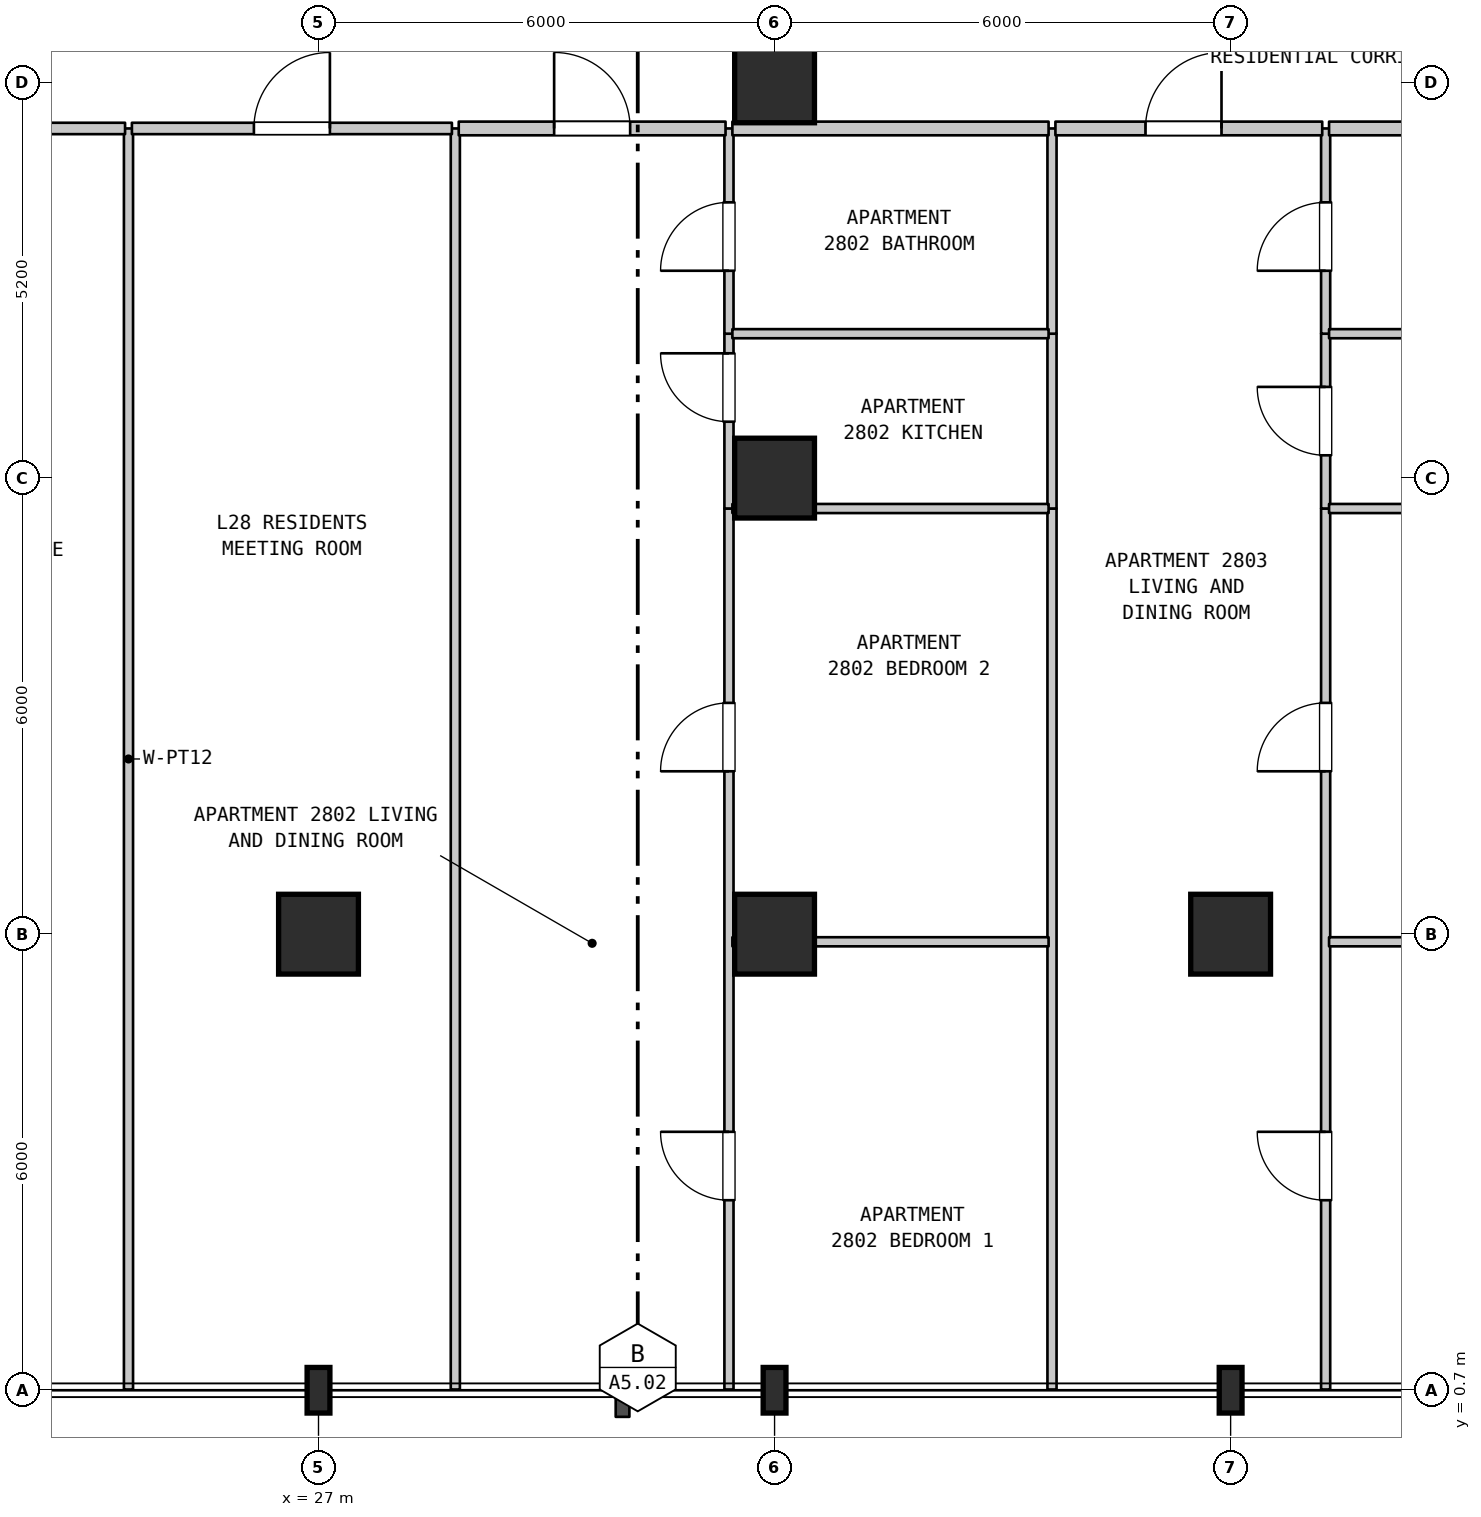
"""IFC4 building model, lengths in metres.
Left out: names, types, materials, properties, quantities, classifications, styles, units other than length and angle.
Written with IfcOpenShell. Run it as: python <this file> out.ifc"""

import sys

from ifc_helpers import new_model, si_unit, direction, frame, frame_2d, origin, origin_2d, place, context, subcontext, project, spatial, rectangle, i_section, extrude, element, fill, save


model = new_model("IFC4")
c1 = context("Model", 3, precision=1e-05, world=origin(), true_north=direction((0.0, 1.0)))
c2 = subcontext(c1, "Body", "Model", "MODEL_VIEW")
j1 = project(units=[si_unit("LENGTHUNIT", "METRE"), si_unit("PLANEANGLEUNIT", "RADIAN")], contexts=[c1])
p1 = place(None, origin())
s1 = spatial("IfcSite", under=j1, at=p1, CompositionType="ELEMENT")
p2 = place(p1, origin())
s2 = spatial("IfcBuilding", under=s1, at=p2, CompositionType="ELEMENT")
p3 = place(p2, frame((0.0, 0.0, 116.8)))
s3 = spatial("IfcBuildingStorey", under=s2, at=p3, CompositionType="ELEMENT", Elevation=116.8)
p4 = place(p3, frame((27.0, 0.7, 0.0), z_axis=(0.0, 0.0, 1.0), x_axis=(1.0, 0.0, 0.0)))
e1 = element("IfcColumn", 1, at=p4, inside=s3, PredefinedType="COLUMN", context=c2, shape_type="SweptSolid", body=[
    extrude(i_section(OverallWidth=0.3, OverallDepth=0.6, WebThickness=0.015, FlangeThickness=0.03, FilletRadius=0.027, at=origin_2d()), origin(), (0.0, 0.0, 1.0), 3.7),
])
p5 = place(p3, frame((27.0, 6.7, 0.0), z_axis=(0.0, 0.0, 1.0), x_axis=(1.0, 0.0, 0.0)))
e2 = element("IfcColumn", 2, at=p5, inside=s3, PredefinedType="COLUMN", context=c2, shape_type="SweptSolid", body=[
    extrude(rectangle(XDim=1.05, YDim=1.05, at=origin_2d()), origin(), (0.0, 0.0, 1.0), 3.7),
])
p6 = place(p3, frame((33.0, 0.7, 0.0), z_axis=(0.0, 0.0, 1.0), x_axis=(1.0, 0.0, 0.0)))
e3 = element("IfcColumn", 3, at=p6, inside=s3, PredefinedType="COLUMN", context=c2, shape_type="SweptSolid", body=[
    extrude(i_section(OverallWidth=0.3, OverallDepth=0.6, WebThickness=0.015, FlangeThickness=0.03, FilletRadius=0.027, at=origin_2d()), origin(), (0.0, 0.0, 1.0), 3.7),
])
for number, where, z_axis, x_axis in (
    (4, (33.0, 6.7, 0.0), (0.0, 0.0, 1.0), (1.0, 0.0, 0.0)),
    (5, (33.0, 12.7, 0.0), (0.0, 0.0, 1.0), (1.0, 0.0, 0.0)),
    (6, (33.0, 17.9, 0.0), (0.0, 0.0, 1.0), (1.0, 0.0, 0.0)),
):
    element("IfcColumn", number, at=place(p3, frame(where, z_axis=z_axis, x_axis=x_axis)), inside=s3, PredefinedType="COLUMN", context=c2, shape_type="SweptSolid", body=[
        extrude(rectangle(XDim=1.05, YDim=1.05, at=origin_2d()), origin(), (0.0, 0.0, 1.0), 3.7),
    ])
p7 = place(p3, frame((39.0, 0.7, 0.0), z_axis=(0.0, 0.0, 1.0), x_axis=(1.0, 0.0, 0.0)))
e7 = element("IfcColumn", 7, at=p7, inside=s3, PredefinedType="COLUMN", context=c2, shape_type="SweptSolid", body=[
    extrude(i_section(OverallWidth=0.3, OverallDepth=0.6, WebThickness=0.015, FlangeThickness=0.03, FilletRadius=0.027, at=origin_2d()), origin(), (0.0, 0.0, 1.0), 3.7),
])
p8 = place(p3, frame((39.0, 6.7, 0.0), z_axis=(0.0, 0.0, 1.0), x_axis=(1.0, 0.0, 0.0)))
e8 = element("IfcColumn", 8, at=p8, inside=s3, PredefinedType="COLUMN", context=c2, shape_type="SweptSolid", body=[
    extrude(rectangle(XDim=1.05, YDim=1.05, at=origin_2d()), origin(), (0.0, 0.0, 1.0), 3.7),
])
for number, where, z_axis, x_axis in (
    (9, (24.5, 0.71, 0.0), (0.0, 0.0, 1.0), (0.0, 1.0, 0.0)),
    (10, (28.8, 0.71, 0.0), (0.0, 0.0, 1.0), (0.0, 1.0, 0.0)),
):
    element("IfcWall", number, at=place(p3, frame(where, z_axis=z_axis, x_axis=x_axis)), inside=s3, PredefinedType="PARTITIONING", context=c2, shape_type="SweptSolid", body=[
        extrude(rectangle(XDim=16.59, YDim=0.12, at=frame_2d((8.295, 0.0))), origin(), (0.0, 0.0, 1.0), 3.38),
    ])
p9 = place(p3, frame((32.4, 0.71, 0.0), z_axis=(0.0, 0.0, 1.0), x_axis=(0.0, 1.0, 0.0)))
e11 = element("IfcWall", 11, at=p9, inside=s3, PredefinedType="PARTITIONING", context=c2, shape_type="SweptSolid", body=[
    extrude(rectangle(XDim=11.59, YDim=0.12, at=frame_2d((5.795, 0.0))), origin(), (0.0, 0.0, 1.0), 3.38),
])
p10 = place(p9, frame((2.49, 0.0, 0.0)))
e12 = element("IfcOpeningElement", 12, at=p10, cuts=e11, PredefinedType="OPENING", context=c2, shape_type="SweptSolid", body=[
    extrude(rectangle(XDim=0.9, YDim=2.15, at=frame_2d((0.45, 1.075))), frame((0.0, 0.07, 0.0), z_axis=(0.0, -1.0, 0.0), x_axis=(1.0, 0.0, 0.0)), (0.0, 0.0, 1.0), 0.14),
])
p11 = place(p9, frame((8.133, 0.0, 0.0)))
e13 = element("IfcOpeningElement", 13, at=p11, cuts=e11, PredefinedType="OPENING", context=c2, shape_type="SweptSolid", body=[
    extrude(rectangle(XDim=0.9, YDim=2.15, at=frame_2d((0.45, 1.075))), frame((0.0, 0.07, 0.0), z_axis=(0.0, -1.0, 0.0), x_axis=(1.0, 0.0, 0.0)), (0.0, 0.0, 1.0), 0.14),
])
p12 = place(p3, frame((32.4, 12.3, 0.0), z_axis=(0.0, 0.0, 1.0), x_axis=(0.0, 1.0, 0.0)))
e14 = element("IfcWall", 14, at=p12, inside=s3, PredefinedType="PARTITIONING", context=c2, shape_type="SweptSolid", body=[
    extrude(rectangle(XDim=2.3, YDim=0.12, at=frame_2d((1.15, 0.0))), origin(), (0.0, 0.0, 1.0), 3.38),
])
p13 = place(p12, frame((1.142, 0.0, 0.0)))
e15 = element("IfcOpeningElement", 15, at=p13, cuts=e14, PredefinedType="OPENING", context=c2, shape_type="SweptSolid", body=[
    extrude(rectangle(XDim=0.9, YDim=2.15, at=frame_2d((0.45, 1.075))), frame((0.0, 0.07, 0.0), z_axis=(0.0, -1.0, 0.0), x_axis=(1.0, 0.0, 0.0)), (0.0, 0.0, 1.0), 0.14),
])
p14 = place(p3, frame((32.4, 14.6, 0.0), z_axis=(0.0, 0.0, 1.0), x_axis=(0.0, 1.0, 0.0)))
e16 = element("IfcWall", 16, at=p14, inside=s3, PredefinedType="PARTITIONING", context=c2, shape_type="SweptSolid", body=[
    extrude(rectangle(XDim=2.7, YDim=0.12, at=frame_2d((1.35, 0.0))), origin(), (0.0, 0.0, 1.0), 3.38),
])
p15 = place(p14, frame((0.828, 0.0, 0.0)))
e17 = element("IfcOpeningElement", 17, at=p15, cuts=e16, PredefinedType="OPENING", context=c2, shape_type="SweptSolid", body=[
    extrude(rectangle(XDim=0.9, YDim=2.1, at=frame_2d((0.45, 1.05))), frame((0.0, 0.07, 0.0), z_axis=(0.0, -1.0, 0.0), x_axis=(1.0, 0.0, 0.0)), (0.0, 0.0, 1.0), 0.14),
])
p16 = place(p3, frame((36.65, 0.71, 0.0), z_axis=(0.0, 0.0, 1.0), x_axis=(0.0, 1.0, 0.0)))
e18 = element("IfcWall", 18, at=p16, inside=s3, PredefinedType="PARTITIONING", context=c2, shape_type="SweptSolid", body=[
    extrude(rectangle(XDim=11.59, YDim=0.12, at=frame_2d((5.795, 0.0))), origin(), (0.0, 0.0, 1.0), 3.38),
])
p17 = place(p3, frame((36.65, 12.3, 0.0), z_axis=(0.0, 0.0, 1.0), x_axis=(0.0, 1.0, 0.0)))
e19 = element("IfcWall", 19, at=p17, inside=s3, PredefinedType="PARTITIONING", context=c2, shape_type="SweptSolid", body=[
    extrude(rectangle(XDim=2.3, YDim=0.12, at=frame_2d((1.15, 0.0))), origin(), (0.0, 0.0, 1.0), 3.38),
])
p18 = place(p3, frame((36.65, 14.6, 0.0), z_axis=(0.0, 0.0, 1.0), x_axis=(0.0, 1.0, 0.0)))
e20 = element("IfcWall", 20, at=p18, inside=s3, PredefinedType="PARTITIONING", context=c2, shape_type="SweptSolid", body=[
    extrude(rectangle(XDim=2.7, YDim=0.12, at=frame_2d((1.35, 0.0))), origin(), (0.0, 0.0, 1.0), 3.38),
])
p19 = place(p3, frame((40.25, 0.71, 0.0), z_axis=(0.0, 0.0, 1.0), x_axis=(0.0, 1.0, 0.0)))
e21 = element("IfcWall", 21, at=p19, inside=s3, PredefinedType="PARTITIONING", context=c2, shape_type="SweptSolid", body=[
    extrude(rectangle(XDim=11.59, YDim=0.12, at=frame_2d((5.795, 0.0))), origin(), (0.0, 0.0, 1.0), 3.38),
])
p20 = place(p19, frame((2.49, 0.0, 0.0)))
e22 = element("IfcOpeningElement", 22, at=p20, cuts=e21, PredefinedType="OPENING", context=c2, shape_type="SweptSolid", body=[
    extrude(rectangle(XDim=0.9, YDim=2.15, at=frame_2d((0.45, 1.075))), frame((0.0, 0.07, 0.0), z_axis=(0.0, -1.0, 0.0), x_axis=(1.0, 0.0, 0.0)), (0.0, 0.0, 1.0), 0.14),
])
p21 = place(p19, frame((8.133, 0.0, 0.0)))
e23 = element("IfcOpeningElement", 23, at=p21, cuts=e21, PredefinedType="OPENING", context=c2, shape_type="SweptSolid", body=[
    extrude(rectangle(XDim=0.9, YDim=2.15, at=frame_2d((0.45, 1.075))), frame((0.0, 0.07, 0.0), z_axis=(0.0, -1.0, 0.0), x_axis=(1.0, 0.0, 0.0)), (0.0, 0.0, 1.0), 0.14),
])
p22 = place(p3, frame((40.25, 12.3, 0.0), z_axis=(0.0, 0.0, 1.0), x_axis=(0.0, 1.0, 0.0)))
e24 = element("IfcWall", 24, at=p22, inside=s3, PredefinedType="PARTITIONING", context=c2, shape_type="SweptSolid", body=[
    extrude(rectangle(XDim=2.3, YDim=0.12, at=frame_2d((1.15, 0.0))), origin(), (0.0, 0.0, 1.0), 3.38),
])
p23 = place(p22, frame((0.7, 0.0, 0.0)))
e25 = element("IfcOpeningElement", 25, at=p23, cuts=e24, PredefinedType="OPENING", context=c2, shape_type="SweptSolid", body=[
    extrude(rectangle(XDim=0.9, YDim=2.15, at=frame_2d((0.45, 1.075))), frame((0.0, 0.07, 0.0), z_axis=(0.0, -1.0, 0.0), x_axis=(1.0, 0.0, 0.0)), (0.0, 0.0, 1.0), 0.14),
])
p24 = place(p3, frame((40.25, 14.6, 0.0), z_axis=(0.0, 0.0, 1.0), x_axis=(0.0, 1.0, 0.0)))
e26 = element("IfcWall", 26, at=p24, inside=s3, PredefinedType="PARTITIONING", context=c2, shape_type="SweptSolid", body=[
    extrude(rectangle(XDim=2.7, YDim=0.12, at=frame_2d((1.35, 0.0))), origin(), (0.0, 0.0, 1.0), 3.38),
])
p25 = place(p24, frame((0.828, 0.0, 0.0)))
e27 = element("IfcOpeningElement", 27, at=p25, cuts=e26, PredefinedType="OPENING", context=c2, shape_type="SweptSolid", body=[
    extrude(rectangle(XDim=0.9, YDim=2.1, at=frame_2d((0.45, 1.05))), frame((0.0, 0.07, 0.0), z_axis=(0.0, -1.0, 0.0), x_axis=(1.0, 0.0, 0.0)), (0.0, 0.0, 1.0), 0.14),
])
p26 = place(p3, frame((32.445, 6.6, 0.0), z_axis=(0.0, 0.0, 1.0), x_axis=(1.0, 0.0, 0.0)))
e28 = element("IfcWall", 28, at=p26, inside=s3, PredefinedType="PARTITIONING", context=c2, shape_type="SweptSolid", body=[
    extrude(rectangle(XDim=4.16, YDim=0.12, at=frame_2d((2.08, 0.0))), origin(), (0.0, 0.0, 1.0), 2.93),
])
p27 = place(p3, frame((40.295, 6.6, 0.0), z_axis=(0.0, 0.0, 1.0), x_axis=(1.0, 0.0, 0.0)))
e29 = element("IfcWall", 29, at=p27, inside=s3, PredefinedType="PARTITIONING", context=c2, shape_type="SweptSolid", body=[
    extrude(rectangle(XDim=4.16, YDim=0.12, at=frame_2d((2.08, 0.0))), origin(), (0.0, 0.0, 1.0), 2.78),
])
p28 = place(p3, frame((32.445, 12.3, 0.0), z_axis=(0.0, 0.0, 1.0), x_axis=(1.0, 0.0, 0.0)))
e30 = element("IfcWall", 30, at=p28, inside=s3, PredefinedType="PARTITIONING", context=c2, shape_type="SweptSolid", body=[
    extrude(rectangle(XDim=4.16, YDim=0.12, at=frame_2d((2.08, 0.0))), origin(), (0.0, 0.0, 1.0), 3.38),
])
p29 = place(p3, frame((40.295, 12.3, 0.0), z_axis=(0.0, 0.0, 1.0), x_axis=(1.0, 0.0, 0.0)))
e31 = element("IfcWall", 31, at=p29, inside=s3, PredefinedType="PARTITIONING", context=c2, shape_type="SweptSolid", body=[
    extrude(rectangle(XDim=4.16, YDim=0.12, at=frame_2d((2.08, 0.0))), origin(), (0.0, 0.0, 1.0), 3.38),
])
p30 = place(p3, frame((32.445, 14.6, 0.0), z_axis=(0.0, 0.0, 1.0), x_axis=(1.0, 0.0, 0.0)))
e32 = element("IfcWall", 32, at=p30, inside=s3, PredefinedType="PARTITIONING", context=c2, shape_type="SweptSolid", body=[
    extrude(rectangle(XDim=4.16, YDim=0.12, at=frame_2d((2.08, 0.0))), origin(), (0.0, 0.0, 1.0), 3.38),
])
p31 = place(p3, frame((40.295, 14.6, 0.0), z_axis=(0.0, 0.0, 1.0), x_axis=(1.0, 0.0, 0.0)))
e33 = element("IfcWall", 33, at=p31, inside=s3, PredefinedType="PARTITIONING", context=c2, shape_type="SweptSolid", body=[
    extrude(rectangle(XDim=4.16, YDim=0.12, at=frame_2d((2.08, 0.0))), origin(), (0.0, 0.0, 1.0), 3.38),
])
p32 = place(p3, frame((20.545, 17.3, 0.0), z_axis=(0.0, 0.0, 1.0), x_axis=(1.0, 0.0, 0.0)))
e34 = element("IfcWall", 34, at=p32, inside=s3, PredefinedType="STANDARD", context=c2, shape_type="SweptSolid", body=[
    extrude(rectangle(XDim=3.91, YDim=0.15, at=frame_2d((1.955, 0.0))), origin(), (0.0, 0.0, 1.0), 3.38),
])
p33 = place(p32, frame((1.455, 0.0, 0.0)))
e35 = element("IfcOpeningElement", 35, at=p33, cuts=e34, PredefinedType="OPENING", context=c2, shape_type="SweptSolid", body=[
    extrude(rectangle(XDim=1.0, YDim=2.15, at=frame_2d((0.5, 1.075))), frame((0.0, 0.085, 0.0), z_axis=(0.0, -1.0, 0.0), x_axis=(1.0, 0.0, 0.0)), (0.0, 0.0, 1.0), 0.17),
])
p34 = place(p3, frame((24.545, 17.3, 0.0), z_axis=(0.0, 0.0, 1.0), x_axis=(1.0, 0.0, 0.0)))
e36 = element("IfcWall", 36, at=p34, inside=s3, PredefinedType="STANDARD", context=c2, shape_type="SweptSolid", body=[
    extrude(rectangle(XDim=4.21, YDim=0.15, at=frame_2d((2.105, 0.0))), origin(), (0.0, 0.0, 1.0), 3.38),
])
p35 = place(p34, frame((1.605, 0.0, 0.0)))
e37 = element("IfcOpeningElement", 37, at=p35, cuts=e36, PredefinedType="OPENING", context=c2, shape_type="SweptSolid", body=[
    extrude(rectangle(XDim=1.0, YDim=2.15, at=frame_2d((0.5, 1.075))), frame((0.0, 0.085, 0.0), z_axis=(0.0, -1.0, 0.0), x_axis=(1.0, 0.0, 0.0)), (0.0, 0.0, 1.0), 0.17),
])
p36 = place(p3, frame((28.845, 17.3, 0.0), z_axis=(0.0, 0.0, 1.0), x_axis=(1.0, 0.0, 0.0)))
e38 = element("IfcWall", 38, at=p36, inside=s3, PredefinedType="STANDARD", context=c2, shape_type="SweptSolid", body=[
    extrude(rectangle(XDim=3.51, YDim=0.18, at=frame_2d((1.755, 0.0))), origin(), (0.0, 0.0, 1.0), 3.38),
])
p37 = place(p36, frame((1.255, 0.0, 0.0)))
e39 = element("IfcOpeningElement", 39, at=p37, cuts=e38, PredefinedType="OPENING", context=c2, shape_type="SweptSolid", body=[
    extrude(rectangle(XDim=1.0, YDim=2.15, at=frame_2d((0.5, 1.075))), frame((0.0, 0.1, 0.0), z_axis=(0.0, -1.0, 0.0), x_axis=(1.0, 0.0, 0.0)), (0.0, 0.0, 1.0), 0.2),
])
p38 = place(p3, frame((32.445, 17.3, 0.0), z_axis=(0.0, 0.0, 1.0), x_axis=(1.0, 0.0, 0.0)))
e40 = element("IfcWall", 40, at=p38, inside=s3, PredefinedType="STANDARD", context=c2, shape_type="SweptSolid", body=[
    extrude(rectangle(XDim=4.16, YDim=0.18, at=frame_2d((2.08, 0.0))), origin(), (0.0, 0.0, 1.0), 3.38),
])
p39 = place(p3, frame((36.695, 17.3, 0.0), z_axis=(0.0, 0.0, 1.0), x_axis=(1.0, 0.0, 0.0)))
e41 = element("IfcWall", 41, at=p39, inside=s3, PredefinedType="STANDARD", context=c2, shape_type="SweptSolid", body=[
    extrude(rectangle(XDim=3.51, YDim=0.18, at=frame_2d((1.755, 0.0))), origin(), (0.0, 0.0, 1.0), 3.38),
])
p40 = place(p39, frame((1.185, 0.0, 0.0)))
e42 = element("IfcOpeningElement", 42, at=p40, cuts=e41, PredefinedType="OPENING", context=c2, shape_type="SweptSolid", body=[
    extrude(rectangle(XDim=1.0, YDim=2.15, at=frame_2d((0.5, 1.075))), frame((0.0, 0.1, 0.0), z_axis=(0.0, -1.0, 0.0), x_axis=(1.0, 0.0, 0.0)), (0.0, 0.0, 1.0), 0.2),
])
p41 = place(p3, frame((40.295, 17.3, 0.0), z_axis=(0.0, 0.0, 1.0), x_axis=(1.0, 0.0, 0.0)))
e43 = element("IfcWall", 43, at=p41, inside=s3, PredefinedType="STANDARD", context=c2, shape_type="SweptSolid", body=[
    extrude(rectangle(XDim=4.16, YDim=0.18, at=frame_2d((2.08, 0.0))), origin(), (0.0, 0.0, 1.0), 3.38),
])
p42 = place(p10, origin())
e44 = element("IfcDoor", 44, at=p42, inside=s3, OperationType="SINGLE_SWING_RIGHT", PredefinedType="DOOR", context=c2, shape_type="SweptSolid", body=[
    extrude(rectangle(XDim=0.9, YDim=2.15, at=frame_2d((0.45, 1.075))), frame((0.0, 0.025, 0.0), z_axis=(0.0, -1.0, 0.0), x_axis=(1.0, 0.0, 0.0)), (0.0, 0.0, 1.0), 0.05),
])
fill(e12, e44)
p43 = place(p11, origin())
e45 = element("IfcDoor", 45, at=p43, inside=s3, OperationType="SINGLE_SWING_LEFT", PredefinedType="DOOR", context=c2, shape_type="SweptSolid", body=[
    extrude(rectangle(XDim=0.9, YDim=2.15, at=frame_2d((0.45, 1.075))), frame((0.0, 0.025, 0.0), z_axis=(0.0, -1.0, 0.0), x_axis=(1.0, 0.0, 0.0)), (0.0, 0.0, 1.0), 0.05),
])
fill(e13, e45)
p44 = place(p13, origin())
e46 = element("IfcDoor", 46, at=p44, inside=s3, OperationType="SINGLE_SWING_RIGHT", PredefinedType="DOOR", context=c2, shape_type="SweptSolid", body=[
    extrude(rectangle(XDim=0.9, YDim=2.15, at=frame_2d((0.45, 1.075))), frame((0.0, 0.025, 0.0), z_axis=(0.0, -1.0, 0.0), x_axis=(1.0, 0.0, 0.0)), (0.0, 0.0, 1.0), 0.05),
])
fill(e15, e46)
p45 = place(p15, origin())
e47 = element("IfcDoor", 47, at=p45, inside=s3, OperationType="SINGLE_SWING_LEFT", PredefinedType="DOOR", context=c2, shape_type="SweptSolid", body=[
    extrude(rectangle(XDim=0.9, YDim=2.1, at=frame_2d((0.45, 1.05))), frame((0.0, 0.025, 0.0), z_axis=(0.0, -1.0, 0.0), x_axis=(1.0, 0.0, 0.0)), (0.0, 0.0, 1.0), 0.05),
])
fill(e17, e47)
p46 = place(p20, origin())
e48 = element("IfcDoor", 48, at=p46, inside=s3, OperationType="SINGLE_SWING_RIGHT", PredefinedType="DOOR", context=c2, shape_type="SweptSolid", body=[
    extrude(rectangle(XDim=0.9, YDim=2.15, at=frame_2d((0.45, 1.075))), frame((0.0, 0.025, 0.0), z_axis=(0.0, -1.0, 0.0), x_axis=(1.0, 0.0, 0.0)), (0.0, 0.0, 1.0), 0.05),
])
fill(e22, e48)
p47 = place(p21, origin())
e49 = element("IfcDoor", 49, at=p47, inside=s3, OperationType="SINGLE_SWING_LEFT", PredefinedType="DOOR", context=c2, shape_type="SweptSolid", body=[
    extrude(rectangle(XDim=0.9, YDim=2.15, at=frame_2d((0.45, 1.075))), frame((0.0, 0.025, 0.0), z_axis=(0.0, -1.0, 0.0), x_axis=(1.0, 0.0, 0.0)), (0.0, 0.0, 1.0), 0.05),
])
fill(e23, e49)
p48 = place(p23, origin())
e50 = element("IfcDoor", 50, at=p48, inside=s3, OperationType="SINGLE_SWING_RIGHT", PredefinedType="DOOR", context=c2, shape_type="SweptSolid", body=[
    extrude(rectangle(XDim=0.9, YDim=2.15, at=frame_2d((0.45, 1.075))), frame((0.0, 0.025, 0.0), z_axis=(0.0, -1.0, 0.0), x_axis=(1.0, 0.0, 0.0)), (0.0, 0.0, 1.0), 0.05),
])
fill(e25, e50)
p49 = place(p25, origin())
e51 = element("IfcDoor", 51, at=p49, inside=s3, OperationType="SINGLE_SWING_LEFT", PredefinedType="DOOR", context=c2, shape_type="SweptSolid", body=[
    extrude(rectangle(XDim=0.9, YDim=2.1, at=frame_2d((0.45, 1.05))), frame((0.0, 0.025, 0.0), z_axis=(0.0, -1.0, 0.0), x_axis=(1.0, 0.0, 0.0)), (0.0, 0.0, 1.0), 0.05),
])
fill(e27, e51)
p50 = place(p35, origin())
e52 = element("IfcDoor", 52, at=p50, inside=s3, OperationType="SINGLE_SWING_RIGHT", PredefinedType="DOOR", context=c2, shape_type="SweptSolid", body=[
    extrude(rectangle(XDim=1.0, YDim=2.15, at=frame_2d((0.5, 1.075))), frame((0.0, 0.025, 0.0), z_axis=(0.0, -1.0, 0.0), x_axis=(1.0, 0.0, 0.0)), (0.0, 0.0, 1.0), 0.05),
])
fill(e37, e52)
p51 = place(p37, origin())
e53 = element("IfcDoor", 53, at=p51, inside=s3, OperationType="SINGLE_SWING_LEFT", PredefinedType="DOOR", context=c2, shape_type="SweptSolid", body=[
    extrude(rectangle(XDim=1.0, YDim=2.15, at=frame_2d((0.5, 1.075))), frame((0.0, 0.025, 0.0), z_axis=(0.0, -1.0, 0.0), x_axis=(1.0, 0.0, 0.0)), (0.0, 0.0, 1.0), 0.05),
])
fill(e39, e53)
p52 = place(p40, origin())
e54 = element("IfcDoor", 54, at=p52, inside=s3, OperationType="SINGLE_SWING_RIGHT", PredefinedType="DOOR", context=c2, shape_type="SweptSolid", body=[
    extrude(rectangle(XDim=1.0, YDim=2.15, at=frame_2d((0.5, 1.075))), frame((0.0, 0.025, 0.0), z_axis=(0.0, -1.0, 0.0), x_axis=(1.0, 0.0, 0.0)), (0.0, 0.0, 1.0), 0.05),
])
fill(e42, e54)
save(model, sys.argv[1])
